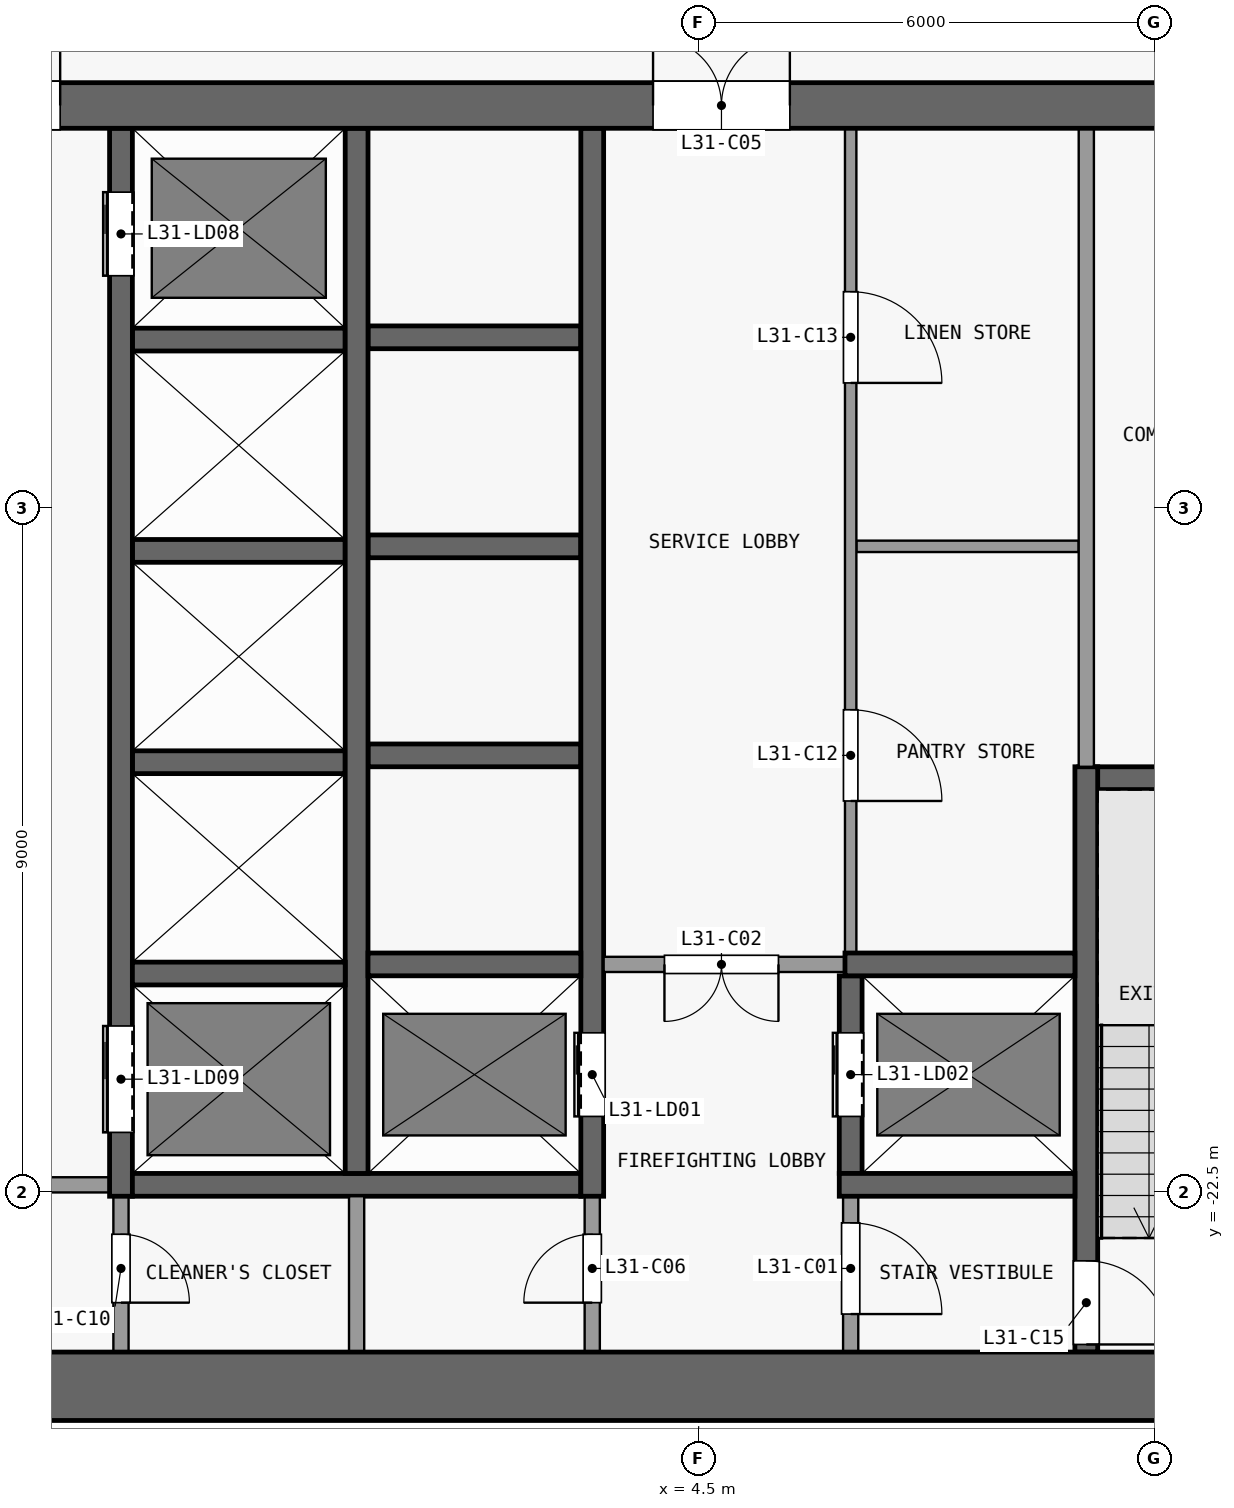
"""IFC4 building model, lengths in metres.
Left out: names, types, materials, properties, quantities, classifications, styles, units other than length and angle.
Written with IfcOpenShell. Run it as: python <this file> out.ifc"""

import sys

from ifc_helpers import new_model, si_unit, direction, frame, frame_2d, origin, place, context, subcontext, project, spatial, rectangle, extrude, element, fill, save


model = new_model("IFC4")
c1 = context("Model", 3, precision=1e-05, world=origin(), true_north=direction((0.0, 1.0)))
c2 = subcontext(c1, "Body", "Model", "MODEL_VIEW")
j1 = project(units=[si_unit("LENGTHUNIT", "METRE"), si_unit("PLANEANGLEUNIT", "RADIAN")], contexts=[c1])
p1 = place(None, origin())
s1 = spatial("IfcSite", under=j1, at=p1, CompositionType="ELEMENT")
p2 = place(p1, origin())
s2 = spatial("IfcBuilding", under=s1, at=p2, CompositionType="ELEMENT")
p3 = place(p2, frame((0.0, 0.0, 124.3)))
s3 = spatial("IfcBuildingStorey", under=s2, at=p3, CompositionType="ELEMENT", Elevation=124.3)
p4 = place(p3, frame((-13.4, -25.05, 0.0), z_axis=(0.0, 0.0, 1.0), x_axis=(1.0, 0.0, 0.0)))
e1 = element("IfcWall", 1, at=p4, inside=s3, PredefinedType="SHEAR", context=c2, shape_type="SweptSolid", body=[
    extrude(rectangle(XDim=26.8, YDim=0.9, at=frame_2d((13.4, 0.0))), origin(), (0.0, 0.0, 1.0), 3.3),
])
p5 = place(p3, frame((-13.4, -8.2, 0.0), z_axis=(0.0, 0.0, 1.0), x_axis=(1.0, 0.0, 0.0)))
e2 = element("IfcWall", 2, at=p5, inside=s3, PredefinedType="SHEAR", context=c2, shape_type="SweptSolid", body=[
    extrude(rectangle(XDim=26.8, YDim=0.6, at=frame_2d((13.4, 0.0))), origin(), (0.0, 0.0, 1.0), 3.3),
])
p6 = place(p5, frame((7.7, 0.0, 0.0)))
e3 = element("IfcOpeningElement", 3, at=p6, cuts=e2, PredefinedType="OPENING", context=c2, shape_type="SweptSolid", body=[
    extrude(rectangle(XDim=1.8, YDim=2.1, at=frame_2d((0.9, 1.05))), frame((0.0, 0.31, 0.0), z_axis=(0.0, -1.0, 0.0), x_axis=(1.0, 0.0, 0.0)), (0.0, 0.0, 1.0), 0.62),
])
p7 = place(p5, frame((17.3, 0.0, 0.0)))
e4 = element("IfcOpeningElement", 4, at=p7, cuts=e2, PredefinedType="OPENING", context=c2, shape_type="SweptSolid", body=[
    extrude(rectangle(XDim=1.8, YDim=2.1, at=frame_2d((0.9, 1.05))), frame((0.0, 0.31, 0.0), z_axis=(0.0, -1.0, 0.0), x_axis=(1.0, 0.0, 0.0)), (0.0, 0.0, 1.0), 0.62),
])
p8 = place(p5, frame((2.625, 0.0, 0.0)))
e5 = element("IfcOpeningElement", 5, at=p8, cuts=e2, PredefinedType="OPENING", context=c2, shape_type="SweptSolid", body=[
    extrude(rectangle(XDim=0.9, YDim=2.1, at=frame_2d((0.45, 1.05))), frame((0.0, 0.31, 0.0), z_axis=(0.0, -1.0, 0.0), x_axis=(1.0, 0.0, 0.0)), (0.0, 0.0, 1.0), 0.62),
])
p9 = place(p5, frame((23.975, 0.0, 0.0)))
e6 = element("IfcOpeningElement", 6, at=p9, cuts=e2, PredefinedType="OPENING", context=c2, shape_type="SweptSolid", body=[
    extrude(rectangle(XDim=1.2, YDim=2.1, at=frame_2d((0.6, 1.05))), frame((0.0, 0.31, 0.0), z_axis=(0.0, -1.0, 0.0), x_axis=(1.0, 0.0, 0.0)), (0.0, 0.0, 1.0), 0.62),
])
p10 = place(p3, frame((-3.25, -22.4, 0.0), z_axis=(0.0, 0.0, 1.0), x_axis=(-1.0, 0.0, 0.0)))
e7 = element("IfcWall", 7, at=p10, inside=s3, PredefinedType="PARTITIONING", context=c2, shape_type="SweptSolid", body=[
    extrude(rectangle(XDim=3.1, YDim=0.2, at=frame_2d((1.55, 0.0))), origin(), (0.0, 0.0, 1.0), 3.3),
])
p11 = place(p10, frame((0.8, 0.0, 0.0)))
e8 = element("IfcOpeningElement", 8, at=p11, cuts=e7, PredefinedType="OPENING", context=c2, shape_type="SweptSolid", body=[
    extrude(rectangle(XDim=1.5, YDim=2.1, at=frame_2d((0.75, 1.05))), frame((0.0, 0.11, 0.0), z_axis=(0.0, -1.0, 0.0), x_axis=(1.0, 0.0, 0.0)), (0.0, 0.0, 1.0), 0.22),
])
p12 = place(p3, frame((-2.95, -22.4, 0.0), z_axis=(0.0, 0.0, 1.0), x_axis=(1.0, 0.0, 0.0)))
e9 = element("IfcWall", 9, at=p12, inside=s3, PredefinedType="SHEAR", context=c2, shape_type="SweptSolid", body=[
    extrude(rectangle(XDim=5.9, YDim=0.3, at=frame_2d((2.95, 0.0))), origin(), (0.0, 0.0, 1.0), 3.3),
])
p13 = place(p3, frame((6.35, -22.4, 0.0), z_axis=(0.0, 0.0, 1.0), x_axis=(1.0, 0.0, 0.0)))
e10 = element("IfcWall", 10, at=p13, inside=s3, PredefinedType="SHEAR", context=c2, shape_type="SweptSolid", body=[
    extrude(rectangle(XDim=3.1, YDim=0.3, at=frame_2d((1.55, 0.0))), origin(), (0.0, 0.0, 1.0), 3.3),
])
for number, where, z_axis, x_axis in (
    (11, (-2.95, -19.62, 0.0), (0.0, 0.0, 1.0), (1.0, 0.0, 0.0)),
    (12, (0.15, -19.5, 0.0), (0.0, 0.0, 1.0), (1.0, 0.0, 0.0)),
):
    element("IfcWall", number, at=place(p3, frame(where, z_axis=z_axis, x_axis=x_axis)), inside=s3, PredefinedType="SHEAR", context=c2, shape_type="SweptSolid", body=[
        extrude(rectangle(XDim=2.8, YDim=0.3, at=frame_2d((1.4, 0.0))), origin(), (0.0, 0.0, 1.0), 3.3),
    ])
p14 = place(p3, frame((6.575, -19.5, 0.0), z_axis=(0.0, 0.0, 1.0), x_axis=(-1.0, 0.0, 0.0)))
e13 = element("IfcWall", 13, at=p14, inside=s3, PredefinedType="PARTITIONING", context=c2, shape_type="SweptSolid", body=[
    extrude(rectangle(XDim=3.325, YDim=0.2, at=frame_2d((1.663, 0.0))), origin(), (0.0, 0.0, 1.0), 3.3),
])
p15 = place(p14, frame((1.025, 0.0, 0.0)))
e14 = element("IfcOpeningElement", 14, at=p15, cuts=e13, PredefinedType="OPENING", context=c2, shape_type="SweptSolid", body=[
    extrude(rectangle(XDim=1.5, YDim=2.1, at=frame_2d((0.75, 1.05))), frame((0.0, 0.11, 0.0), z_axis=(0.0, -1.0, 0.0), x_axis=(1.0, 0.0, 0.0)), (0.0, 0.0, 1.0), 0.22),
])
p16 = place(p3, frame((6.425, -19.5, 0.0), z_axis=(0.0, 0.0, 1.0), x_axis=(1.0, 0.0, 0.0)))
e15 = element("IfcWall", 15, at=p16, inside=s3, PredefinedType="SHEAR", context=c2, shape_type="SweptSolid", body=[
    extrude(rectangle(XDim=3.025, YDim=0.3, at=frame_2d((1.512, 0.0))), origin(), (0.0, 0.0, 1.0), 3.3),
])
p17 = place(p3, frame((9.5, -17.05, 0.0), z_axis=(0.0, 0.0, 1.0), x_axis=(1.0, 0.0, 0.0)))
e16 = element("IfcWall", 16, at=p17, inside=s3, PredefinedType="SHEAR", context=c2, shape_type="SweptSolid", body=[
    extrude(rectangle(XDim=3.1, YDim=0.3, at=frame_2d((1.55, 0.0))), origin(), (0.0, 0.0, 1.0), 3.3),
])
for number, where, z_axis, x_axis in (
    (17, (-2.95, -16.84, 0.0), (0.0, 0.0, 1.0), (1.0, 0.0, 0.0)),
    (18, (0.15, -16.75, 0.0), (0.0, 0.0, 1.0), (1.0, 0.0, 0.0)),
    (19, (-2.95, -14.06, 0.0), (0.0, 0.0, 1.0), (1.0, 0.0, 0.0)),
    (20, (0.15, -14.0, 0.0), (0.0, 0.0, 1.0), (1.0, 0.0, 0.0)),
):
    element("IfcWall", number, at=place(p3, frame(where, z_axis=z_axis, x_axis=x_axis)), inside=s3, PredefinedType="SHEAR", context=c2, shape_type="SweptSolid", body=[
        extrude(rectangle(XDim=2.8, YDim=0.3, at=frame_2d((1.4, 0.0))), origin(), (0.0, 0.0, 1.0), 3.3),
    ])
p18 = place(p3, frame((6.575, -14.0, 0.0), z_axis=(0.0, 0.0, 1.0), x_axis=(1.0, 0.0, 0.0)))
e21 = element("IfcWall", 21, at=p18, inside=s3, PredefinedType="PARTITIONING", context=c2, shape_type="SweptSolid", body=[
    extrude(rectangle(XDim=2.925, YDim=0.15, at=frame_2d((1.462, 0.0))), origin(), (0.0, 0.0, 1.0), 3.3),
])
for number, where, z_axis, x_axis in (
    (22, (-2.95, -11.28, 0.0), (0.0, 0.0, 1.0), (1.0, 0.0, 0.0)),
    (23, (0.15, -11.25, 0.0), (0.0, 0.0, 1.0), (1.0, 0.0, 0.0)),
):
    element("IfcWall", number, at=place(p3, frame(where, z_axis=z_axis, x_axis=x_axis)), inside=s3, PredefinedType="SHEAR", context=c2, shape_type="SweptSolid", body=[
        extrude(rectangle(XDim=2.8, YDim=0.3, at=frame_2d((1.4, 0.0))), origin(), (0.0, 0.0, 1.0), 3.3),
    ])
p19 = place(p3, frame((-3.1, -22.55, 0.0), z_axis=(0.0, 0.0, 1.0), x_axis=(0.0, -1.0, 0.0)))
e24 = element("IfcWall", 24, at=p19, inside=s3, PredefinedType="PARTITIONING", context=c2, shape_type="SweptSolid", body=[
    extrude(rectangle(XDim=2.05, YDim=0.2, at=frame_2d((1.025, 0.0))), origin(), (0.0, 0.0, 1.0), 3.3),
])
p20 = place(p19, frame((0.5, 0.0, 0.0)))
e25 = element("IfcOpeningElement", 25, at=p20, cuts=e24, PredefinedType="OPENING", context=c2, shape_type="SweptSolid", body=[
    extrude(rectangle(XDim=0.9, YDim=2.1, at=frame_2d((0.45, 1.05))), frame((0.0, 0.11, 0.0), z_axis=(0.0, -1.0, 0.0), x_axis=(1.0, 0.0, 0.0)), (0.0, 0.0, 1.0), 0.22),
])
p21 = place(p3, frame((-3.1, -22.55, 0.0), z_axis=(0.0, 0.0, 1.0), x_axis=(0.0, 1.0, 0.0)))
e26 = element("IfcWall", 26, at=p21, inside=s3, PredefinedType="SHEAR", context=c2, shape_type="SweptSolid", body=[
    extrude(rectangle(XDim=14.05, YDim=0.3, at=frame_2d((7.025, 0.0))), origin(), (0.0, 0.0, 1.0), 3.3),
])
p22 = place(p21, frame((12.11, 0.0, 0.0)))
e27 = element("IfcOpeningElement", 27, at=p22, cuts=e26, PredefinedType="OPENING", context=c2, shape_type="SweptSolid", body=[
    extrude(rectangle(XDim=1.1, YDim=2.1, at=frame_2d((0.55, 1.05))), frame((0.0, 0.16, 0.0), z_axis=(0.0, -1.0, 0.0), x_axis=(1.0, 0.0, 0.0)), (0.0, 0.0, 1.0), 0.32),
])
p23 = place(p21, frame((0.84, 0.0, 0.0)))
e28 = element("IfcOpeningElement", 28, at=p23, cuts=e26, PredefinedType="OPENING", context=c2, shape_type="SweptSolid", body=[
    extrude(rectangle(XDim=1.4, YDim=2.1, at=frame_2d((0.7, 1.05))), frame((0.0, 0.16, 0.0), z_axis=(0.0, -1.0, 0.0), x_axis=(1.0, 0.0, 0.0)), (0.0, 0.0, 1.0), 0.32),
])
p24 = place(p3, frame((0.0, -24.6, 0.0), z_axis=(0.0, 0.0, 1.0), x_axis=(0.0, 1.0, 0.0)))
e29 = element("IfcWall", 29, at=p24, inside=s3, PredefinedType="PARTITIONING", context=c2, shape_type="SweptSolid", body=[
    extrude(rectangle(XDim=2.05, YDim=0.2, at=frame_2d((1.025, 0.0))), origin(), (0.0, 0.0, 1.0), 3.3),
])
p25 = place(p3, frame((0.0, -22.25, 0.0), z_axis=(0.0, 0.0, 1.0), x_axis=(0.0, 1.0, 0.0)))
e30 = element("IfcWall", 30, at=p25, inside=s3, PredefinedType="SHEAR", context=c2, shape_type="SweptSolid", body=[
    extrude(rectangle(XDim=13.75, YDim=0.3, at=frame_2d((6.875, 0.0))), origin(), (0.0, 0.0, 1.0), 3.3),
])
p26 = place(p3, frame((3.1, -24.6, 0.0), z_axis=(0.0, 0.0, 1.0), x_axis=(0.0, 1.0, 0.0)))
e31 = element("IfcWall", 31, at=p26, inside=s3, PredefinedType="PARTITIONING", context=c2, shape_type="SweptSolid", body=[
    extrude(rectangle(XDim=2.05, YDim=0.2, at=frame_2d((1.025, 0.0))), origin(), (0.0, 0.0, 1.0), 3.3),
])
p27 = place(p26, frame((0.65, 0.0, 0.0)))
e32 = element("IfcOpeningElement", 32, at=p27, cuts=e31, PredefinedType="OPENING", context=c2, shape_type="SweptSolid", body=[
    extrude(rectangle(XDim=0.9, YDim=2.1, at=frame_2d((0.45, 1.05))), frame((0.0, 0.11, 0.0), z_axis=(0.0, -1.0, 0.0), x_axis=(1.0, 0.0, 0.0)), (0.0, 0.0, 1.0), 0.22),
])
p28 = place(p3, frame((3.1, -22.55, 0.0), z_axis=(0.0, 0.0, 1.0), x_axis=(0.0, 1.0, 0.0)))
e33 = element("IfcWall", 33, at=p28, inside=s3, PredefinedType="SHEAR", context=c2, shape_type="SweptSolid", body=[
    extrude(rectangle(XDim=14.05, YDim=0.3, at=frame_2d((7.025, 0.0))), origin(), (0.0, 0.0, 1.0), 3.3),
])
p29 = place(p28, frame((1.05, 0.0, 0.0)))
e34 = element("IfcOpeningElement", 34, at=p29, cuts=e33, PredefinedType="OPENING", context=c2, shape_type="SweptSolid", body=[
    extrude(rectangle(XDim=1.1, YDim=2.1, at=frame_2d((0.55, 1.05))), frame((0.0, 0.16, 0.0), z_axis=(0.0, -1.0, 0.0), x_axis=(1.0, 0.0, 0.0)), (0.0, 0.0, 1.0), 0.32),
])
p30 = place(p3, frame((6.5, -22.55, 0.0), z_axis=(0.0, 0.0, 1.0), x_axis=(0.0, -1.0, 0.0)))
e35 = element("IfcWall", 35, at=p30, inside=s3, PredefinedType="PARTITIONING", context=c2, shape_type="SweptSolid", body=[
    extrude(rectangle(XDim=2.05, YDim=0.2, at=frame_2d((1.025, 0.0))), origin(), (0.0, 0.0, 1.0), 3.3),
])
p31 = place(p30, frame((0.35, 0.0, 0.0)))
e36 = element("IfcOpeningElement", 36, at=p31, cuts=e35, PredefinedType="OPENING", context=c2, shape_type="SweptSolid", body=[
    extrude(rectangle(XDim=1.2, YDim=2.1, at=frame_2d((0.6, 1.05))), frame((0.0, 0.11, 0.0), z_axis=(0.0, -1.0, 0.0), x_axis=(1.0, 0.0, 0.0)), (0.0, 0.0, 1.0), 0.22),
])
p32 = place(p3, frame((6.5, -22.25, 0.0), z_axis=(0.0, 0.0, 1.0), x_axis=(0.0, 1.0, 0.0)))
e37 = element("IfcWall", 37, at=p32, inside=s3, PredefinedType="SHEAR", context=c2, shape_type="SweptSolid", body=[
    extrude(rectangle(XDim=2.6, YDim=0.3, at=frame_2d((1.3, 0.0))), origin(), (0.0, 0.0, 1.0), 3.3),
])
p33 = place(p32, frame((0.75, 0.0, 0.0)))
e38 = element("IfcOpeningElement", 38, at=p33, cuts=e37, PredefinedType="OPENING", context=c2, shape_type="SweptSolid", body=[
    extrude(rectangle(XDim=1.1, YDim=2.1, at=frame_2d((0.55, 1.05))), frame((0.0, 0.16, 0.0), z_axis=(0.0, -1.0, 0.0), x_axis=(1.0, 0.0, 0.0)), (0.0, 0.0, 1.0), 0.32),
])
p34 = place(p3, frame((6.5, -8.5, 0.0), z_axis=(0.0, 0.0, 1.0), x_axis=(0.0, -1.0, 0.0)))
e39 = element("IfcWall", 39, at=p34, inside=s3, PredefinedType="PARTITIONING", context=c2, shape_type="SweptSolid", body=[
    extrude(rectangle(XDim=10.85, YDim=0.15, at=frame_2d((5.425, 0.0))), origin(), (0.0, 0.0, 1.0), 3.3),
])
p35 = place(p34, frame((7.65, 0.0, 0.0)))
e40 = element("IfcOpeningElement", 40, at=p35, cuts=e39, PredefinedType="OPENING", context=c2, shape_type="SweptSolid", body=[
    extrude(rectangle(XDim=1.2, YDim=2.1, at=frame_2d((0.6, 1.05))), frame((0.0, 0.085, 0.0), z_axis=(0.0, -1.0, 0.0), x_axis=(1.0, 0.0, 0.0)), (0.0, 0.0, 1.0), 0.17),
])
p36 = place(p34, frame((2.15, 0.0, 0.0)))
e41 = element("IfcOpeningElement", 41, at=p36, cuts=e39, PredefinedType="OPENING", context=c2, shape_type="SweptSolid", body=[
    extrude(rectangle(XDim=1.2, YDim=2.1, at=frame_2d((0.6, 1.05))), frame((0.0, 0.085, 0.0), z_axis=(0.0, -1.0, 0.0), x_axis=(1.0, 0.0, 0.0)), (0.0, 0.0, 1.0), 0.17),
])
p37 = place(p3, frame((9.6, -16.9, 0.0), z_axis=(0.0, 0.0, 1.0), x_axis=(0.0, -1.0, 0.0)))
e42 = element("IfcWall", 42, at=p37, inside=s3, PredefinedType="SHEAR", context=c2, shape_type="SweptSolid", body=[
    extrude(rectangle(XDim=7.7, YDim=0.3, at=frame_2d((3.85, 0.0))), origin(), (0.0, 0.0, 1.0), 3.3),
])
p38 = place(p37, frame((6.5, 0.0, 0.0)))
e43 = element("IfcOpeningElement", 43, at=p38, cuts=e42, PredefinedType="OPENING", context=c2, shape_type="SweptSolid", body=[
    extrude(rectangle(XDim=1.1, YDim=2.1, at=frame_2d((0.55, 1.05))), frame((0.0, 0.16, 0.0), z_axis=(0.0, -1.0, 0.0), x_axis=(1.0, 0.0, 0.0)), (0.0, 0.0, 1.0), 0.32),
])
p39 = place(p3, frame((9.6, -16.9, 0.0), z_axis=(0.0, 0.0, 1.0), x_axis=(0.0, 1.0, 0.0)))
e44 = element("IfcWall", 44, at=p39, inside=s3, PredefinedType="PARTITIONING", context=c2, shape_type="SweptSolid", body=[
    extrude(rectangle(XDim=8.4, YDim=0.2, at=frame_2d((4.2, 0.0))), origin(), (0.0, 0.0, 1.0), 3.3),
])
p40 = place(p29, origin())
e45 = element("IfcDoor", 45, at=p40, inside=s3, OperationType="DOUBLE_DOOR_SLIDING", PredefinedType="DOOR", context=c2, shape_type="SweptSolid", body=[
    extrude(rectangle(XDim=1.1, YDim=2.1, at=frame_2d((0.55, 1.05))), frame((0.0, 0.025, 0.0), z_axis=(0.0, -1.0, 0.0), x_axis=(1.0, 0.0, 0.0)), (0.0, 0.0, 1.0), 0.05),
])
fill(e34, e45)
p41 = place(p33, origin())
e46 = element("IfcDoor", 46, at=p41, inside=s3, OperationType="DOUBLE_DOOR_SLIDING", PredefinedType="DOOR", context=c2, shape_type="SweptSolid", body=[
    extrude(rectangle(XDim=1.1, YDim=2.1, at=frame_2d((0.55, 1.05))), frame((0.0, 0.025, 0.0), z_axis=(0.0, -1.0, 0.0), x_axis=(1.0, 0.0, 0.0)), (0.0, 0.0, 1.0), 0.05),
])
fill(e38, e46)
p42 = place(p22, origin())
e47 = element("IfcDoor", 47, at=p42, inside=s3, OperationType="DOUBLE_DOOR_SLIDING", PredefinedType="DOOR", context=c2, shape_type="SweptSolid", body=[
    extrude(rectangle(XDim=1.1, YDim=2.1, at=frame_2d((0.55, 1.05))), frame((0.0, 0.025, 0.0), z_axis=(0.0, -1.0, 0.0), x_axis=(1.0, 0.0, 0.0)), (0.0, 0.0, 1.0), 0.05),
])
fill(e27, e47)
p43 = place(p23, origin())
e48 = element("IfcDoor", 48, at=p43, inside=s3, OperationType="DOUBLE_DOOR_SLIDING", PredefinedType="DOOR", context=c2, shape_type="SweptSolid", body=[
    extrude(rectangle(XDim=1.4, YDim=2.1, at=frame_2d((0.7, 1.05))), frame((0.0, 0.025, 0.0), z_axis=(0.0, -1.0, 0.0), x_axis=(1.0, 0.0, 0.0)), (0.0, 0.0, 1.0), 0.05),
])
fill(e28, e48)
p44 = place(p31, origin())
e49 = element("IfcDoor", 49, at=p44, inside=s3, OperationType="SINGLE_SWING_RIGHT", PredefinedType="DOOR", context=c2, shape_type="SweptSolid", body=[
    extrude(rectangle(XDim=1.2, YDim=2.1, at=frame_2d((0.6, 1.05))), frame((0.0, 0.025, 0.0), z_axis=(0.0, -1.0, 0.0), x_axis=(1.0, 0.0, 0.0)), (0.0, 0.0, 1.0), 0.05),
])
fill(e36, e49)
p45 = place(p15, origin())
e50 = element("IfcDoor", 50, at=p45, inside=s3, OperationType="DOUBLE_DOOR_SINGLE_SWING", PredefinedType="DOOR", context=c2, shape_type="SweptSolid", body=[
    extrude(rectangle(XDim=1.5, YDim=2.1, at=frame_2d((0.75, 1.05))), frame((0.0, 0.025, 0.0), z_axis=(0.0, -1.0, 0.0), x_axis=(1.0, 0.0, 0.0)), (0.0, 0.0, 1.0), 0.05),
])
fill(e14, e50)
p46 = place(p6, origin())
e51 = element("IfcDoor", 51, at=p46, inside=s3, OperationType="DOUBLE_DOOR_SINGLE_SWING", PredefinedType="DOOR", context=c2, shape_type="SweptSolid", body=[
    extrude(rectangle(XDim=1.8, YDim=2.1, at=frame_2d((0.9, 1.05))), frame((0.0, 0.025, 0.0), z_axis=(0.0, -1.0, 0.0), x_axis=(1.0, 0.0, 0.0)), (0.0, 0.0, 1.0), 0.05),
])
fill(e3, e51)
p47 = place(p7, origin())
e52 = element("IfcDoor", 52, at=p47, inside=s3, OperationType="DOUBLE_DOOR_SINGLE_SWING", PredefinedType="DOOR", context=c2, shape_type="SweptSolid", body=[
    extrude(rectangle(XDim=1.8, YDim=2.1, at=frame_2d((0.9, 1.05))), frame((0.0, 0.025, 0.0), z_axis=(0.0, -1.0, 0.0), x_axis=(1.0, 0.0, 0.0)), (0.0, 0.0, 1.0), 0.05),
])
fill(e4, e52)
p48 = place(p27, origin())
e53 = element("IfcDoor", 53, at=p48, inside=s3, OperationType="SINGLE_SWING_LEFT", PredefinedType="DOOR", context=c2, shape_type="SweptSolid", body=[
    extrude(rectangle(XDim=0.9, YDim=2.1, at=frame_2d((0.45, 1.05))), frame((0.0, 0.025, 0.0), z_axis=(0.0, -1.0, 0.0), x_axis=(1.0, 0.0, 0.0)), (0.0, 0.0, 1.0), 0.05),
])
fill(e32, e53)
p49 = place(p20, origin())
e54 = element("IfcDoor", 54, at=p49, inside=s3, OperationType="SINGLE_SWING_RIGHT", PredefinedType="DOOR", context=c2, shape_type="SweptSolid", body=[
    extrude(rectangle(XDim=0.9, YDim=2.1, at=frame_2d((0.45, 1.05))), frame((0.0, 0.025, 0.0), z_axis=(0.0, -1.0, 0.0), x_axis=(1.0, 0.0, 0.0)), (0.0, 0.0, 1.0), 0.05),
])
fill(e25, e54)
p50 = place(p35, origin())
e55 = element("IfcDoor", 55, at=p50, inside=s3, OperationType="SINGLE_SWING_RIGHT", PredefinedType="DOOR", context=c2, shape_type="SweptSolid", body=[
    extrude(rectangle(XDim=1.2, YDim=2.1, at=frame_2d((0.6, 1.05))), frame((0.0, 0.025, 0.0), z_axis=(0.0, -1.0, 0.0), x_axis=(1.0, 0.0, 0.0)), (0.0, 0.0, 1.0), 0.05),
])
fill(e40, e55)
p51 = place(p36, origin())
e56 = element("IfcDoor", 56, at=p51, inside=s3, OperationType="SINGLE_SWING_RIGHT", PredefinedType="DOOR", context=c2, shape_type="SweptSolid", body=[
    extrude(rectangle(XDim=1.2, YDim=2.1, at=frame_2d((0.6, 1.05))), frame((0.0, 0.025, 0.0), z_axis=(0.0, -1.0, 0.0), x_axis=(1.0, 0.0, 0.0)), (0.0, 0.0, 1.0), 0.05),
])
fill(e41, e56)
p52 = place(p38, origin())
e57 = element("IfcDoor", 57, at=p52, inside=s3, OperationType="SINGLE_SWING_RIGHT", PredefinedType="DOOR", context=c2, shape_type="SweptSolid", body=[
    extrude(rectangle(XDim=1.1, YDim=2.1, at=frame_2d((0.55, 1.05))), frame((0.0, 0.025, 0.0), z_axis=(0.0, -1.0, 0.0), x_axis=(1.0, 0.0, 0.0)), (0.0, 0.0, 1.0), 0.05),
])
fill(e43, e57)
save(model, sys.argv[1])
